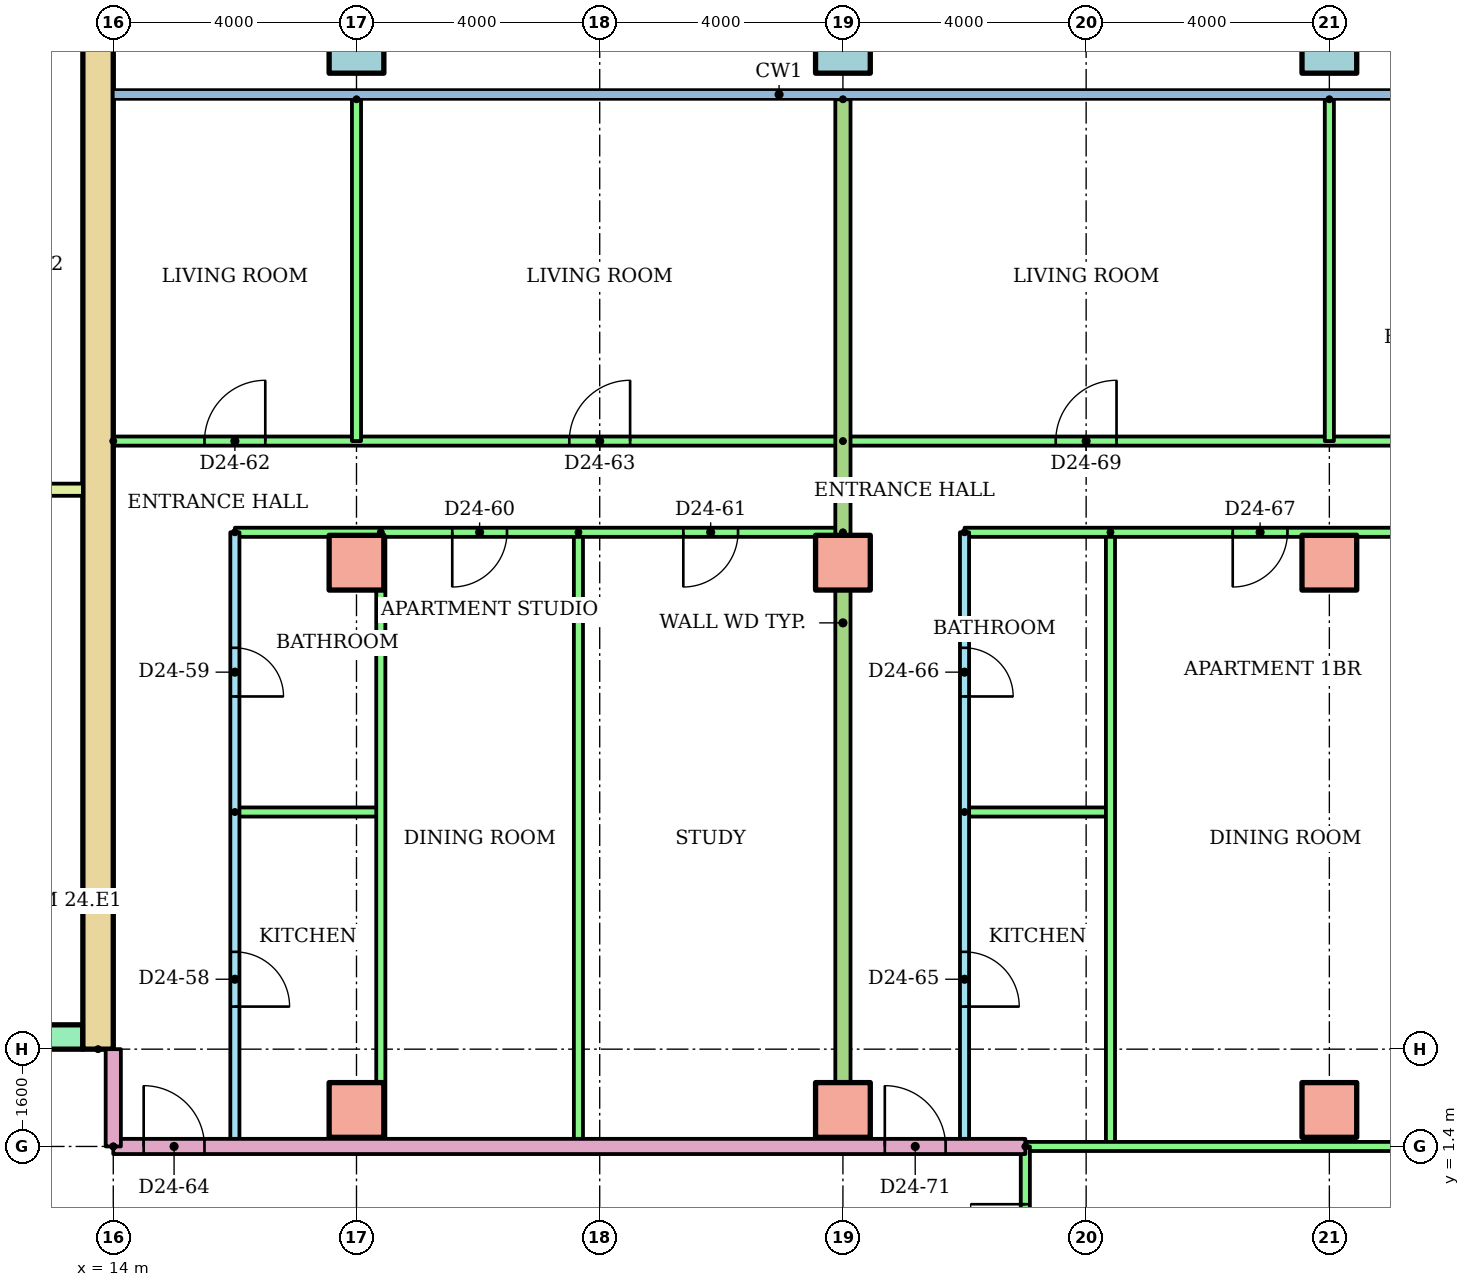
"""IFC4 building model, lengths in metres.
Left out: names, types, materials, properties, quantities, classifications, styles, units other than length and angle.
Written with IfcOpenShell. Run it as: python <this file> out.ifc"""

import sys

from ifc_helpers import new_model, si_unit, direction, frame, frame_2d, origin, origin_2d, place, context, subcontext, project, spatial, rectangle, hollow_rectangle, extrude, element, fill, save


model = new_model("IFC4")
c1 = context("Model", 3, precision=1e-05, world=origin(), true_north=direction((0.0, 1.0)))
c2 = subcontext(c1, "Body", "Model", "MODEL_VIEW")
j1 = project(units=[si_unit("LENGTHUNIT", "METRE"), si_unit("PLANEANGLEUNIT", "RADIAN")], contexts=[c1])
p1 = place(None, origin())
s1 = spatial("IfcSite", under=j1, at=p1, CompositionType="ELEMENT")
p2 = place(p1, origin())
s2 = spatial("IfcBuilding", under=s1, at=p2, CompositionType="ELEMENT")
p3 = place(p2, frame((0.0, 0.0, 93.5)))
s3 = spatial("IfcBuildingStorey", under=s2, at=p3, CompositionType="ELEMENT", Elevation=93.5)
for number, where in (
    (1, (18.0, 2.0, 0.0)),
    (2, (26.0, 2.0, 0.0)),
    (3, (34.0, 2.0, 0.0)),
    (4, (18.0, 11.0, 0.0)),
    (5, (26.0, 11.0, 0.0)),
    (6, (34.0, 11.0, 0.0)),
):
    element("IfcColumn", number, at=place(p3, frame(where)), inside=s3, PredefinedType="COLUMN", context=c2, shape_type="SweptSolid", body=[
        extrude(rectangle(XDim=0.9, YDim=0.9, at=origin_2d()), origin(), (0.0, 0.0, 1.0), 3.2),
    ])
for number, where in (
    (7, (18.0, 19.5, 0.0)),
    (8, (26.0, 19.5, 0.0)),
    (9, (34.0, 19.5, 0.0)),
):
    element("IfcColumn", number, at=place(p3, frame(where)), inside=s3, PredefinedType="COLUMN", context=c2, shape_type="SweptSolid", body=[
        extrude(hollow_rectangle(XDim=0.9, YDim=0.9, WallThickness=0.045, at=origin_2d()), origin(), (0.0, 0.0, 1.0), 3.2),
    ])
p4 = place(p3, frame((13.75, 3.0, 0.0), z_axis=(0.0, 0.0, 1.0), x_axis=(0.0, 1.0, 0.0)))
e10 = element("IfcWall", 10, at=p4, inside=s3, PredefinedType="SHEAR", context=c2, shape_type="SweptSolid", body=[
    extrude(rectangle(XDim=17.0, YDim=0.5, at=frame_2d((8.5, 0.0))), origin(), (0.0, 0.0, 1.0), 2.92),
])
p5 = place(p3, frame((-13.5, 3.2, 0.0)))
e11 = element("IfcWall", 11, at=p5, inside=s3, PredefinedType="SHEAR", context=c2, shape_type="SweptSolid", body=[
    extrude(rectangle(XDim=27.0, YDim=0.4, at=frame_2d((13.5, 0.0))), origin(), (0.0, 0.0, 1.0), 2.92),
])
p6 = place(p5, frame((6.861, 0.0, 0.0)))
e12 = element("IfcOpeningElement", 12, at=p6, cuts=e11, PredefinedType="OPENING", context=c2, shape_type="SweptSolid", body=[
    extrude(rectangle(XDim=1.1, YDim=2.1, at=frame_2d((0.55, 1.05))), frame((0.0, 0.21, 0.0), z_axis=(0.0, -1.0, 0.0), x_axis=(1.0, 0.0, 0.0)), (0.0, 0.0, 1.0), 0.42),
])
p7 = place(p5, frame((9.906, 0.0, 0.0)))
e13 = element("IfcOpeningElement", 13, at=p7, cuts=e11, PredefinedType="OPENING", context=c2, shape_type="SweptSolid", body=[
    extrude(rectangle(XDim=1.1, YDim=2.1, at=frame_2d((0.55, 1.05))), frame((0.0, 0.21, 0.0), z_axis=(0.0, -1.0, 0.0), x_axis=(1.0, 0.0, 0.0)), (0.0, 0.0, 1.0), 0.42),
])
p8 = place(p5, frame((15.994, 0.0, 0.0)))
e14 = element("IfcOpeningElement", 14, at=p8, cuts=e11, PredefinedType="OPENING", context=c2, shape_type="SweptSolid", body=[
    extrude(rectangle(XDim=1.1, YDim=2.1, at=frame_2d((0.55, 1.05))), frame((0.0, 0.21, 0.0), z_axis=(0.0, -1.0, 0.0), x_axis=(1.0, 0.0, 0.0)), (0.0, 0.0, 1.0), 0.42),
])
p9 = place(p5, frame((19.039, 0.0, 0.0)))
e15 = element("IfcOpeningElement", 15, at=p9, cuts=e11, PredefinedType="OPENING", context=c2, shape_type="SweptSolid", body=[
    extrude(rectangle(XDim=1.1, YDim=2.1, at=frame_2d((0.55, 1.05))), frame((0.0, 0.21, 0.0), z_axis=(0.0, -1.0, 0.0), x_axis=(1.0, 0.0, 0.0)), (0.0, 0.0, 1.0), 0.42),
])
p10 = place(p5, frame((12.6, 0.0, 0.0)))
e16 = element("IfcOpeningElement", 16, at=p10, cuts=e11, PredefinedType="OPENING", context=c2, shape_type="SweptSolid", body=[
    extrude(rectangle(XDim=1.8, YDim=2.1, at=frame_2d((0.9, 1.05))), frame((0.0, 0.21, 0.0), z_axis=(0.0, -1.0, 0.0), x_axis=(1.0, 0.0, 0.0)), (0.0, 0.0, 1.0), 0.42),
])
p11 = place(p3, frame((9.6, 12.2, 0.0)))
e17 = element("IfcWall", 17, at=p11, inside=s3, PredefinedType="PARTITIONING", context=c2, shape_type="SweptSolid", body=[
    extrude(rectangle(XDim=3.9, YDim=0.2, at=frame_2d((1.95, 0.0))), origin(), (0.0, 0.0, 1.0), 2.92),
])
p12 = place(p3, frame((16.0, 11.5, 0.0), z_axis=(0.0, 0.0, 1.0), x_axis=(0.0, -1.0, 0.0)))
e18 = element("IfcWall", 18, at=p12, inside=s3, PredefinedType="PARTITIONING", context=c2, shape_type="SweptSolid", body=[
    extrude(rectangle(XDim=10.1, YDim=0.15, at=frame_2d((5.05, 0.0))), origin(), (0.0, 0.0, 1.0), 2.4),
])
p13 = place(p12, frame((6.9, 0.0, 0.0)))
e19 = element("IfcOpeningElement", 19, at=p13, cuts=e18, PredefinedType="OPENING", context=c2, shape_type="SweptSolid", body=[
    extrude(rectangle(XDim=0.9, YDim=2.1, at=frame_2d((0.45, 1.05))), frame((0.0, 0.085, 0.0), z_axis=(0.0, -1.0, 0.0), x_axis=(1.0, 0.0, 0.0)), (0.0, 0.0, 1.0), 0.17),
])
p14 = place(p12, frame((1.9, 0.0, 0.0)))
e20 = element("IfcOpeningElement", 20, at=p14, cuts=e18, PredefinedType="OPENING", context=c2, shape_type="SweptSolid", body=[
    extrude(rectangle(XDim=0.8, YDim=2.1, at=frame_2d((0.4, 1.05))), frame((0.0, 0.085, 0.0), z_axis=(0.0, -1.0, 0.0), x_axis=(1.0, 0.0, 0.0)), (0.0, 0.0, 1.0), 0.17),
])
p15 = place(p3, frame((16.0, 6.9, 0.0)))
e21 = element("IfcWall", 21, at=p15, inside=s3, PredefinedType="PARTITIONING", context=c2, shape_type="SweptSolid", body=[
    extrude(rectangle(XDim=2.4, YDim=0.15, at=frame_2d((1.2, 0.0))), origin(), (0.0, 0.0, 1.0), 2.4),
])
for number, where, z_axis, x_axis in (
    (22, (18.4, 11.5, 0.0), (0.0, 0.0, 1.0), (0.0, -1.0, 0.0)),
    (23, (21.65, 11.5, 0.0), (0.0, 0.0, 1.0), (0.0, -1.0, 0.0)),
):
    element("IfcWall", number, at=place(p3, frame(where, z_axis=z_axis, x_axis=x_axis)), inside=s3, PredefinedType="PARTITIONING", context=c2, shape_type="SweptSolid", body=[
        extrude(rectangle(XDim=10.1, YDim=0.15, at=frame_2d((5.05, 0.0))), origin(), (0.0, 0.0, 1.0), 2.4),
    ])
p16 = place(p3, frame((26.0, 11.5, 0.0), z_axis=(0.0, 0.0, 1.0), x_axis=(-1.0, 0.0, 0.0)))
e24 = element("IfcWall", 24, at=p16, inside=s3, PredefinedType="PARTITIONING", context=c2, shape_type="SweptSolid", body=[
    extrude(rectangle(XDim=10.0, YDim=0.15, at=frame_2d((5.0, 0.0))), origin(), (0.0, 0.0, 1.0), 2.4),
])
p17 = place(p16, frame((5.525, 0.0, 0.0)))
e25 = element("IfcOpeningElement", 25, at=p17, cuts=e24, PredefinedType="OPENING", context=c2, shape_type="SweptSolid", body=[
    extrude(rectangle(XDim=0.9, YDim=2.1, at=frame_2d((0.45, 1.05))), frame((0.0, 0.085, 0.0), z_axis=(0.0, -1.0, 0.0), x_axis=(1.0, 0.0, 0.0)), (0.0, 0.0, 1.0), 0.17),
])
p18 = place(p16, frame((1.725, 0.0, 0.0)))
e26 = element("IfcOpeningElement", 26, at=p18, cuts=e24, PredefinedType="OPENING", context=c2, shape_type="SweptSolid", body=[
    extrude(rectangle(XDim=0.9, YDim=2.1, at=frame_2d((0.45, 1.05))), frame((0.0, 0.085, 0.0), z_axis=(0.0, -1.0, 0.0), x_axis=(1.0, 0.0, 0.0)), (0.0, 0.0, 1.0), 0.17),
])
p19 = place(p3, frame((14.0, 13.0, 0.0)))
e27 = element("IfcWall", 27, at=p19, inside=s3, PredefinedType="PARTITIONING", context=c2, shape_type="SweptSolid", body=[
    extrude(rectangle(XDim=12.0, YDim=0.15, at=frame_2d((6.0, 0.0))), origin(), (0.0, 0.0, 1.0), 2.4),
])
p20 = place(p19, frame((1.5, 0.0, 0.0)))
e28 = element("IfcOpeningElement", 28, at=p20, cuts=e27, PredefinedType="OPENING", context=c2, shape_type="SweptSolid", body=[
    extrude(rectangle(XDim=1.0, YDim=2.1, at=frame_2d((0.5, 1.05))), frame((0.0, 0.085, 0.0), z_axis=(0.0, -1.0, 0.0), x_axis=(1.0, 0.0, 0.0)), (0.0, 0.0, 1.0), 0.17),
])
p21 = place(p19, frame((7.5, 0.0, 0.0)))
e29 = element("IfcOpeningElement", 29, at=p21, cuts=e27, PredefinedType="OPENING", context=c2, shape_type="SweptSolid", body=[
    extrude(rectangle(XDim=1.0, YDim=2.1, at=frame_2d((0.5, 1.05))), frame((0.0, 0.085, 0.0), z_axis=(0.0, -1.0, 0.0), x_axis=(1.0, 0.0, 0.0)), (0.0, 0.0, 1.0), 0.17),
])
p22 = place(p3, frame((18.0, 18.621, 0.0), z_axis=(0.0, 0.0, 1.0), x_axis=(0.0, -1.0, 0.0)))
e30 = element("IfcWall", 30, at=p22, inside=s3, PredefinedType="PARTITIONING", context=c2, shape_type="SweptSolid", body=[
    extrude(rectangle(XDim=5.621, YDim=0.15, at=frame_2d((2.811, 0.0))), origin(), (0.0, 0.0, 1.0), 2.4),
])
p23 = place(p3, frame((28.0, 11.5, 0.0), z_axis=(0.0, 0.0, 1.0), x_axis=(0.0, -1.0, 0.0)))
e31 = element("IfcWall", 31, at=p23, inside=s3, PredefinedType="PARTITIONING", context=c2, shape_type="SweptSolid", body=[
    extrude(rectangle(XDim=10.1, YDim=0.15, at=frame_2d((5.05, 0.0))), origin(), (0.0, 0.0, 1.0), 2.4),
])
p24 = place(p23, frame((6.9, 0.0, 0.0)))
e32 = element("IfcOpeningElement", 32, at=p24, cuts=e31, PredefinedType="OPENING", context=c2, shape_type="SweptSolid", body=[
    extrude(rectangle(XDim=0.9, YDim=2.1, at=frame_2d((0.45, 1.05))), frame((0.0, 0.085, 0.0), z_axis=(0.0, -1.0, 0.0), x_axis=(1.0, 0.0, 0.0)), (0.0, 0.0, 1.0), 0.17),
])
p25 = place(p23, frame((1.9, 0.0, 0.0)))
e33 = element("IfcOpeningElement", 33, at=p25, cuts=e31, PredefinedType="OPENING", context=c2, shape_type="SweptSolid", body=[
    extrude(rectangle(XDim=0.8, YDim=2.1, at=frame_2d((0.4, 1.05))), frame((0.0, 0.085, 0.0), z_axis=(0.0, -1.0, 0.0), x_axis=(1.0, 0.0, 0.0)), (0.0, 0.0, 1.0), 0.17),
])
p26 = place(p3, frame((28.0, 6.9, 0.0)))
e34 = element("IfcWall", 34, at=p26, inside=s3, PredefinedType="PARTITIONING", context=c2, shape_type="SweptSolid", body=[
    extrude(rectangle(XDim=2.4, YDim=0.15, at=frame_2d((1.2, 0.0))), origin(), (0.0, 0.0, 1.0), 2.4),
])
p27 = place(p3, frame((30.4, 11.5, 0.0), z_axis=(0.0, 0.0, 1.0), x_axis=(0.0, -1.0, 0.0)))
e35 = element("IfcWall", 35, at=p27, inside=s3, PredefinedType="PARTITIONING", context=c2, shape_type="SweptSolid", body=[
    extrude(rectangle(XDim=10.1, YDim=0.15, at=frame_2d((5.05, 0.0))), origin(), (0.0, 0.0, 1.0), 2.4),
])
p28 = place(p3, frame((40.62, 11.5, 0.0), z_axis=(0.0, 0.0, 1.0), x_axis=(-1.0, 0.0, 0.0)))
e36 = element("IfcWall", 36, at=p28, inside=s3, PredefinedType="PARTITIONING", context=c2, shape_type="SweptSolid", body=[
    extrude(rectangle(XDim=12.62, YDim=0.15, at=frame_2d((6.31, 0.0))), origin(), (0.0, 0.0, 1.0), 2.4),
])
p29 = place(p28, frame((7.309, 0.0, 0.0)))
e37 = element("IfcOpeningElement", 37, at=p29, cuts=e36, PredefinedType="OPENING", context=c2, shape_type="SweptSolid", body=[
    extrude(rectangle(XDim=0.9, YDim=2.1, at=frame_2d((0.45, 1.05))), frame((0.0, 0.085, 0.0), z_axis=(0.0, -1.0, 0.0), x_axis=(1.0, 0.0, 0.0)), (0.0, 0.0, 1.0), 0.17),
])
p30 = place(p28, frame((1.895, 0.0, 0.0)))
e38 = element("IfcOpeningElement", 38, at=p30, cuts=e36, PredefinedType="OPENING", context=c2, shape_type="SweptSolid", body=[
    extrude(rectangle(XDim=0.9, YDim=2.1, at=frame_2d((0.45, 1.05))), frame((0.0, 0.085, 0.0), z_axis=(0.0, -1.0, 0.0), x_axis=(1.0, 0.0, 0.0)), (0.0, 0.0, 1.0), 0.17),
])
p31 = place(p3, frame((26.0, 13.0, 0.0)))
e39 = element("IfcWall", 39, at=p31, inside=s3, PredefinedType="PARTITIONING", context=c2, shape_type="SweptSolid", body=[
    extrude(rectangle(XDim=14.62, YDim=0.15, at=frame_2d((7.31, 0.0))), origin(), (0.0, 0.0, 1.0), 2.4),
])
p32 = place(p31, frame((3.5, 0.0, 0.0)))
e40 = element("IfcOpeningElement", 40, at=p32, cuts=e39, PredefinedType="OPENING", context=c2, shape_type="SweptSolid", body=[
    extrude(rectangle(XDim=1.0, YDim=2.1, at=frame_2d((0.5, 1.05))), frame((0.0, 0.085, 0.0), z_axis=(0.0, -1.0, 0.0), x_axis=(1.0, 0.0, 0.0)), (0.0, 0.0, 1.0), 0.17),
])
p33 = place(p31, frame((10.75, 0.0, 0.0)))
e41 = element("IfcOpeningElement", 41, at=p33, cuts=e39, PredefinedType="OPENING", context=c2, shape_type="SweptSolid", body=[
    extrude(rectangle(XDim=0.9, YDim=2.1, at=frame_2d((0.45, 1.05))), frame((0.0, 0.085, 0.0), z_axis=(0.0, -1.0, 0.0), x_axis=(1.0, 0.0, 0.0)), (0.0, 0.0, 1.0), 0.17),
])
p34 = place(p3, frame((34.0, 18.621, 0.0), z_axis=(0.0, 0.0, 1.0), x_axis=(0.0, -1.0, 0.0)))
e42 = element("IfcWall", 42, at=p34, inside=s3, PredefinedType="PARTITIONING", context=c2, shape_type="SweptSolid", body=[
    extrude(rectangle(XDim=5.621, YDim=0.15, at=frame_2d((2.811, 0.0))), origin(), (0.0, 0.0, 1.0), 2.4),
])
p35 = place(p3, frame((26.0, 18.621, 0.0), z_axis=(0.0, 0.0, 1.0), x_axis=(0.0, -1.0, 0.0)))
e43 = element("IfcWall", 43, at=p35, inside=s3, PredefinedType="PARTITIONING", context=c2, shape_type="SweptSolid", body=[
    extrude(rectangle(XDim=17.221, YDim=0.25, at=frame_2d((8.611, 0.0))), origin(), (0.0, 0.0, 1.0), 2.4),
])
p36 = place(p3, frame((14.0, 1.4, 0.0)))
e44 = element("IfcWall", 44, at=p36, inside=s3, PredefinedType="PARTITIONING", context=c2, shape_type="SweptSolid", body=[
    extrude(rectangle(XDim=15.0, YDim=0.25, at=frame_2d((7.5, 0.0))), origin(), (0.0, 0.0, 1.0), 2.4),
])
p37 = place(p36, frame((0.5, 0.0, 0.0)))
e45 = element("IfcOpeningElement", 45, at=p37, cuts=e44, PredefinedType="OPENING", context=c2, shape_type="SweptSolid", body=[
    extrude(rectangle(XDim=1.0, YDim=2.1, at=frame_2d((0.5, 1.05))), frame((0.0, 0.135, 0.0), z_axis=(0.0, -1.0, 0.0), x_axis=(1.0, 0.0, 0.0)), (0.0, 0.0, 1.0), 0.27),
])
p38 = place(p36, frame((12.689, 0.0, 0.0)))
e46 = element("IfcOpeningElement", 46, at=p38, cuts=e44, PredefinedType="OPENING", context=c2, shape_type="SweptSolid", body=[
    extrude(rectangle(XDim=1.0, YDim=2.1, at=frame_2d((0.5, 1.05))), frame((0.0, 0.135, 0.0), z_axis=(0.0, -1.0, 0.0), x_axis=(1.0, 0.0, 0.0)), (0.0, 0.0, 1.0), 0.27),
])
p39 = place(p3, frame((29.0, 1.4, 0.0)))
e47 = element("IfcWall", 47, at=p39, inside=s3, PredefinedType="PARTITIONING", context=c2, shape_type="SweptSolid", body=[
    extrude(rectangle(XDim=11.62, YDim=0.15, at=frame_2d((5.81, 0.0))), origin(), (0.0, 0.0, 1.0), 2.4),
])
p40 = place(p3, frame((29.0, -1.4, 0.0), z_axis=(0.0, 0.0, 1.0), x_axis=(0.0, 1.0, 0.0)))
e48 = element("IfcWall", 48, at=p40, inside=s3, PredefinedType="PARTITIONING", context=c2, shape_type="SweptSolid", body=[
    extrude(rectangle(XDim=2.8, YDim=0.15, at=frame_2d((1.4, 0.0))), origin(), (0.0, 0.0, 1.0), 2.4),
])
p41 = place(p40, frame((0.95, 0.0, 0.0)))
e49 = element("IfcOpeningElement", 49, at=p41, cuts=e48, PredefinedType="OPENING", context=c2, shape_type="SweptSolid", body=[
    extrude(rectangle(XDim=0.9, YDim=2.1, at=frame_2d((0.45, 1.05))), frame((0.0, 0.085, 0.0), z_axis=(0.0, -1.0, 0.0), x_axis=(1.0, 0.0, 0.0)), (0.0, 0.0, 1.0), 0.17),
])
p42 = place(p3, frame((14.0, 1.4, 0.0), z_axis=(0.0, 0.0, 1.0), x_axis=(0.0, 1.0, 0.0)))
e50 = element("IfcWall", 50, at=p42, inside=s3, PredefinedType="PARTITIONING", context=c2, shape_type="SweptSolid", body=[
    extrude(rectangle(XDim=1.6, YDim=0.25, at=frame_2d((0.8, 0.0))), origin(), (0.0, 0.0, 1.0), 2.4),
])
p43 = place(p13, origin())
e51 = element("IfcDoor", 51, at=p43, inside=s3, OperationType="SINGLE_SWING_RIGHT", PredefinedType="DOOR", context=c2, shape_type="SweptSolid", body=[
    extrude(rectangle(XDim=0.9, YDim=2.1, at=frame_2d((0.45, 1.05))), frame((0.0, 0.025, 0.0), z_axis=(0.0, -1.0, 0.0), x_axis=(1.0, 0.0, 0.0)), (0.0, 0.0, 1.0), 0.05),
])
fill(e19, e51)
p44 = place(p14, origin())
e52 = element("IfcDoor", 52, at=p44, inside=s3, OperationType="SINGLE_SWING_RIGHT", PredefinedType="DOOR", context=c2, shape_type="SweptSolid", body=[
    extrude(rectangle(XDim=0.8, YDim=2.1, at=frame_2d((0.4, 1.05))), frame((0.0, 0.025, 0.0), z_axis=(0.0, -1.0, 0.0), x_axis=(1.0, 0.0, 0.0)), (0.0, 0.0, 1.0), 0.05),
])
fill(e20, e52)
p45 = place(p17, origin())
e53 = element("IfcDoor", 53, at=p45, inside=s3, OperationType="SINGLE_SWING_RIGHT", PredefinedType="DOOR", context=c2, shape_type="SweptSolid", body=[
    extrude(rectangle(XDim=0.9, YDim=2.1, at=frame_2d((0.45, 1.05))), frame((0.0, 0.025, 0.0), z_axis=(0.0, -1.0, 0.0), x_axis=(1.0, 0.0, 0.0)), (0.0, 0.0, 1.0), 0.05),
])
fill(e25, e53)
p46 = place(p18, origin())
e54 = element("IfcDoor", 54, at=p46, inside=s3, OperationType="SINGLE_SWING_RIGHT", PredefinedType="DOOR", context=c2, shape_type="SweptSolid", body=[
    extrude(rectangle(XDim=0.9, YDim=2.1, at=frame_2d((0.45, 1.05))), frame((0.0, 0.025, 0.0), z_axis=(0.0, -1.0, 0.0), x_axis=(1.0, 0.0, 0.0)), (0.0, 0.0, 1.0), 0.05),
])
fill(e26, e54)
p47 = place(p20, origin())
e55 = element("IfcDoor", 55, at=p47, inside=s3, OperationType="SINGLE_SWING_RIGHT", PredefinedType="DOOR", context=c2, shape_type="SweptSolid", body=[
    extrude(rectangle(XDim=1.0, YDim=2.1, at=frame_2d((0.5, 1.05))), frame((0.0, 0.025, 0.0), z_axis=(0.0, -1.0, 0.0), x_axis=(1.0, 0.0, 0.0)), (0.0, 0.0, 1.0), 0.05),
])
fill(e28, e55)
p48 = place(p21, origin())
e56 = element("IfcDoor", 56, at=p48, inside=s3, OperationType="SINGLE_SWING_RIGHT", PredefinedType="DOOR", context=c2, shape_type="SweptSolid", body=[
    extrude(rectangle(XDim=1.0, YDim=2.1, at=frame_2d((0.5, 1.05))), frame((0.0, 0.025, 0.0), z_axis=(0.0, -1.0, 0.0), x_axis=(1.0, 0.0, 0.0)), (0.0, 0.0, 1.0), 0.05),
])
fill(e29, e56)
p49 = place(p37, origin())
e57 = element("IfcDoor", 57, at=p49, inside=s3, OperationType="SINGLE_SWING_LEFT", PredefinedType="DOOR", context=c2, shape_type="SweptSolid", body=[
    extrude(rectangle(XDim=1.0, YDim=2.1, at=frame_2d((0.5, 1.05))), frame((0.0, 0.025, 0.0), z_axis=(0.0, -1.0, 0.0), x_axis=(1.0, 0.0, 0.0)), (0.0, 0.0, 1.0), 0.05),
])
fill(e45, e57)
p50 = place(p24, origin())
e58 = element("IfcDoor", 58, at=p50, inside=s3, OperationType="SINGLE_SWING_RIGHT", PredefinedType="DOOR", context=c2, shape_type="SweptSolid", body=[
    extrude(rectangle(XDim=0.9, YDim=2.1, at=frame_2d((0.45, 1.05))), frame((0.0, 0.025, 0.0), z_axis=(0.0, -1.0, 0.0), x_axis=(1.0, 0.0, 0.0)), (0.0, 0.0, 1.0), 0.05),
])
fill(e32, e58)
p51 = place(p25, origin())
e59 = element("IfcDoor", 59, at=p51, inside=s3, OperationType="SINGLE_SWING_RIGHT", PredefinedType="DOOR", context=c2, shape_type="SweptSolid", body=[
    extrude(rectangle(XDim=0.8, YDim=2.1, at=frame_2d((0.4, 1.05))), frame((0.0, 0.025, 0.0), z_axis=(0.0, -1.0, 0.0), x_axis=(1.0, 0.0, 0.0)), (0.0, 0.0, 1.0), 0.05),
])
fill(e33, e59)
p52 = place(p29, origin())
e60 = element("IfcDoor", 60, at=p52, inside=s3, OperationType="SINGLE_SWING_RIGHT", PredefinedType="DOOR", context=c2, shape_type="SweptSolid", body=[
    extrude(rectangle(XDim=0.9, YDim=2.1, at=frame_2d((0.45, 1.05))), frame((0.0, 0.025, 0.0), z_axis=(0.0, -1.0, 0.0), x_axis=(1.0, 0.0, 0.0)), (0.0, 0.0, 1.0), 0.05),
])
fill(e37, e60)
p53 = place(p32, origin())
e61 = element("IfcDoor", 61, at=p53, inside=s3, OperationType="SINGLE_SWING_RIGHT", PredefinedType="DOOR", context=c2, shape_type="SweptSolid", body=[
    extrude(rectangle(XDim=1.0, YDim=2.1, at=frame_2d((0.5, 1.05))), frame((0.0, 0.025, 0.0), z_axis=(0.0, -1.0, 0.0), x_axis=(1.0, 0.0, 0.0)), (0.0, 0.0, 1.0), 0.05),
])
fill(e40, e61)
p54 = place(p38, origin())
e62 = element("IfcDoor", 62, at=p54, inside=s3, OperationType="SINGLE_SWING_LEFT", PredefinedType="DOOR", context=c2, shape_type="SweptSolid", body=[
    extrude(rectangle(XDim=1.0, YDim=2.1, at=frame_2d((0.5, 1.05))), frame((0.0, 0.025, 0.0), z_axis=(0.0, -1.0, 0.0), x_axis=(1.0, 0.0, 0.0)), (0.0, 0.0, 1.0), 0.05),
])
fill(e46, e62)
p55 = place(p41, origin())
e63 = element("IfcDoor", 63, at=p55, inside=s3, OperationType="SINGLE_SWING_RIGHT", PredefinedType="DOOR", context=c2, shape_type="SweptSolid", body=[
    extrude(rectangle(XDim=0.9, YDim=2.1, at=frame_2d((0.45, 1.05))), frame((0.0, 0.025, 0.0), z_axis=(0.0, -1.0, 0.0), x_axis=(1.0, 0.0, 0.0)), (0.0, 0.0, 1.0), 0.05),
])
fill(e49, e63)
save(model, sys.argv[1])
